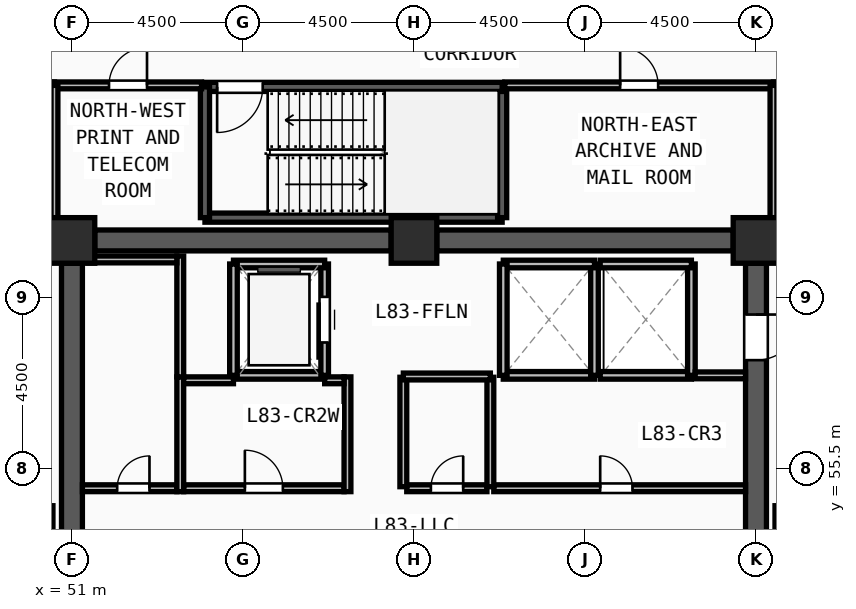
"""IFC4 building model, lengths in metres.
Left out: names, types, materials, properties, quantities, classifications, styles, units other than length and angle.
Written with IfcOpenShell. Run it as: python <this file> out.ifc"""

import sys

from ifc_helpers import new_model, si_unit, direction, frame, frame_2d, origin, origin_2d, place, context, subcontext, project, spatial, rectangle, extrude, source, transform, mapped, element, fill, save


model = new_model("IFC4")
c1 = context("Model", 3, precision=1e-05, world=origin(), true_north=direction((0.0, 1.0)))
c2 = subcontext(c1, "Body", "Model", "MODEL_VIEW")
j1 = project(units=[si_unit("LENGTHUNIT", "METRE"), si_unit("PLANEANGLEUNIT", "RADIAN")], contexts=[c1])
p1 = place(None, origin())
s1 = spatial("IfcSite", under=j1, at=p1, CompositionType="ELEMENT")
p2 = place(p1, origin())
s2 = spatial("IfcBuilding", under=s1, at=p2, CompositionType="ELEMENT")
p3 = place(p2, frame((0.0, 0.0, 320.25)))
s3 = spatial("IfcBuildingStorey", under=s2, at=p3, CompositionType="ELEMENT", Elevation=320.25)
m1 = source(origin(), c2, "Body", "SweptSolid", [
    extrude(rectangle(XDim=1.2, YDim=1.2, at=origin_2d()), origin(), (0.0, 0.0, 1.0), 3.75),
])
for number, where, z_axis, x_axis in (
    (1, (69.0, 61.5, 0.0), (0.0, 0.0, 1.0), (1.0, 0.0, 0.0)),
    (2, (60.0, 61.5, 0.0), (0.0, 0.0, 1.0), (1.0, 0.0, 0.0)),
    (3, (51.0, 61.5, 0.0), (0.0, 0.0, 1.0), (1.0, 0.0, 0.0)),
):
    element("IfcColumn", number, at=place(p3, frame(where, z_axis=z_axis, x_axis=x_axis)), inside=s3, PredefinedType="COLUMN", context=c2, shape_type="MappedRepresentation", body=[
        mapped(m1, transform((0.0, 0.0, 0.0), x_axis=(1.0, 0.0, 0.0), y_axis=(0.0, 1.0, 0.0), z_axis=(0.0, 0.0, 1.0), scale=1.0)),
    ])
for number, where, z_axis, x_axis in (
    (4, (51.6, 61.5, 0.0), (0.0, 0.0, 1.0), (1.0, 0.0, 0.0)),
    (5, (60.6, 61.5, 0.0), (0.0, 0.0, 1.0), (1.0, 0.0, 0.0)),
):
    element("IfcWall", number, at=place(p3, frame(where, z_axis=z_axis, x_axis=x_axis)), inside=s3, PredefinedType="SHEAR", context=c2, shape_type="SweptSolid", body=[
        extrude(rectangle(XDim=7.8, YDim=0.55, at=frame_2d((3.9, 0.0))), origin(), (0.0, 0.0, 1.0), 3.47),
    ])
p4 = place(p3, frame((69.0, 60.9, 0.0), z_axis=(0.0, 0.0, 1.0), x_axis=(0.0, -1.0, 0.0)))
e6 = element("IfcWall", 6, at=p4, inside=s3, PredefinedType="SHEAR", context=c2, shape_type="SweptSolid", body=[
    extrude(rectangle(XDim=13.8, YDim=0.55, at=frame_2d((6.9, 0.0))), origin(), (0.0, 0.0, 1.0), 3.47),
])
m2 = source(origin(), c2, "Body", "SweptSolid", [
    extrude(rectangle(XDim=1.2, YDim=2.2, at=frame_2d((0.6, 1.1))), frame((0.0, 0.285, 0.0), z_axis=(0.0, -1.0, 0.0), x_axis=(1.0, 0.0, 0.0)), (0.0, 0.0, 1.0), 0.57),
])
p5 = place(p4, frame((1.35, 0.0, 0.0)))
e7 = element("IfcOpeningElement", 7, at=p5, cuts=e6, PredefinedType="OPENING", context=c2, shape_type="MappedRepresentation", body=[
    mapped(m2, transform((0.0, 0.0, 0.0), x_axis=(1.0, 0.0, 0.0), y_axis=(0.0, 1.0, 0.0), z_axis=(0.0, 0.0, 1.0), scale=1.0)),
])
p6 = place(p3, frame((51.0, 47.1, 0.0), z_axis=(0.0, 0.0, 1.0), x_axis=(0.0, 1.0, 0.0)))
e8 = element("IfcWall", 8, at=p6, inside=s3, PredefinedType="SHEAR", context=c2, shape_type="SweptSolid", body=[
    extrude(rectangle(XDim=13.8, YDim=0.55, at=frame_2d((6.9, 0.0))), origin(), (0.0, 0.0, 1.0), 3.47),
])
for number, where, z_axis, x_axis in (
    (9, (50.38, 46.7, 0.0), (0.0, 0.0, 1.0), (0.0, 1.0, 0.0)),
    (10, (69.62, 54.52, 0.0), (0.0, 0.0, 1.0), (0.0, -1.0, 0.0)),
    (11, (54.5, 62.1, 0.0), (0.0, 0.0, 1.0), (1.0, 0.0, 0.0)),
):
    element("IfcWall", number, at=place(p3, frame(where, z_axis=z_axis, x_axis=x_axis)), inside=s3, PredefinedType="SOLIDWALL", context=c2, shape_type="SweptSolid", body=[
        extrude(rectangle(XDim=7.82, YDim=0.24, at=frame_2d((3.91, 0.0))), origin(), (0.0, 0.0, 1.0), 3.47),
    ])
p7 = place(p3, frame((62.32, 62.1, 0.0), z_axis=(0.0, 0.0, 1.0), x_axis=(0.0, 1.0, 0.0)))
e12 = element("IfcWall", 12, at=p7, inside=s3, PredefinedType="SOLIDWALL", context=c2, shape_type="SweptSolid", body=[
    extrude(rectangle(XDim=3.44, YDim=0.24, at=frame_2d((1.72, 0.0))), origin(), (0.0, 0.0, 1.0), 3.47),
])
p8 = place(p3, frame((62.32, 65.54, 0.0), z_axis=(0.0, 0.0, 1.0), x_axis=(-1.0, 0.0, 0.0)))
e13 = element("IfcWall", 13, at=p8, inside=s3, PredefinedType="SOLIDWALL", context=c2, shape_type="SweptSolid", body=[
    extrude(rectangle(XDim=7.82, YDim=0.24, at=frame_2d((3.91, 0.0))), origin(), (0.0, 0.0, 1.0), 3.47),
])
m3 = source(origin(), c2, "Body", "SweptSolid", [
    extrude(rectangle(XDim=1.2, YDim=2.2, at=frame_2d((0.6, 1.1))), frame((0.0, 0.13, 0.0), z_axis=(0.0, -1.0, 0.0), x_axis=(1.0, 0.0, 0.0)), (0.0, 0.0, 1.0), 0.26),
])
p9 = place(p8, frame((6.3, 0.0, 0.0)))
e14 = element("IfcOpeningElement", 14, at=p9, cuts=e13, PredefinedType="OPENING", context=c2, shape_type="MappedRepresentation", body=[
    mapped(m3, transform((0.0, 0.0, 0.0), x_axis=(1.0, 0.0, 0.0), y_axis=(0.0, 1.0, 0.0), z_axis=(0.0, 0.0, 1.0), scale=1.0)),
])
p10 = place(p3, frame((54.5, 65.54, 0.0), z_axis=(0.0, 0.0, 1.0), x_axis=(0.0, -1.0, 0.0)))
e15 = element("IfcWall", 15, at=p10, inside=s3, PredefinedType="SOLIDWALL", context=c2, shape_type="SweptSolid", body=[
    extrude(rectangle(XDim=3.44, YDim=0.24, at=frame_2d((1.72, 0.0))), origin(), (0.0, 0.0, 1.0), 3.47),
])
p11 = place(p3, frame((55.25, 57.95, 0.0), z_axis=(0.0, 0.0, 1.0), x_axis=(1.0, 0.0, 0.0)))
e16 = element("IfcWall", 16, at=p11, inside=s3, PredefinedType="SOLIDWALL", context=c2, shape_type="SweptSolid", body=[
    extrude(rectangle(XDim=2.4, YDim=0.2, at=frame_2d((1.2, 0.0))), origin(), (0.0, 0.0, 1.0), 3.47),
])
p12 = place(p3, frame((57.65, 57.95, 0.0), z_axis=(0.0, 0.0, 1.0), x_axis=(0.0, 1.0, 0.0)))
e17 = element("IfcWall", 17, at=p12, inside=s3, PredefinedType="SOLIDWALL", context=c2, shape_type="SweptSolid", body=[
    extrude(rectangle(XDim=2.93, YDim=0.2, at=frame_2d((1.465, 0.0))), origin(), (0.0, 0.0, 1.0), 3.47),
])
m4 = source(origin(), c2, "Body", "SweptSolid", [
    extrude(rectangle(XDim=1.2, YDim=2.3, at=frame_2d((0.6, 1.15))), frame((0.0, 0.11, 0.0), z_axis=(0.0, -1.0, 0.0), x_axis=(1.0, 0.0, 0.0)), (0.0, 0.0, 1.0), 0.22),
])
p13 = place(p12, frame((0.865, 0.0, 0.0)))
e18 = element("IfcOpeningElement", 18, at=p13, cuts=e17, PredefinedType="OPENING", context=c2, shape_type="MappedRepresentation", body=[
    mapped(m4, transform((0.0, 0.0, 0.0), x_axis=(1.0, 0.0, 0.0), y_axis=(0.0, 1.0, 0.0), z_axis=(0.0, 0.0, 1.0), scale=1.0)),
])
p14 = place(p3, frame((57.65, 60.88, 0.0), z_axis=(0.0, 0.0, 1.0), x_axis=(-1.0, 0.0, 0.0)))
e19 = element("IfcWall", 19, at=p14, inside=s3, PredefinedType="SOLIDWALL", context=c2, shape_type="SweptSolid", body=[
    extrude(rectangle(XDim=2.4, YDim=0.2, at=frame_2d((1.2, 0.0))), origin(), (0.0, 0.0, 1.0), 3.47),
])
p15 = place(p3, frame((55.25, 60.88, 0.0), z_axis=(0.0, 0.0, 1.0), x_axis=(0.0, -1.0, 0.0)))
e20 = element("IfcWall", 20, at=p15, inside=s3, PredefinedType="SOLIDWALL", context=c2, shape_type="SweptSolid", body=[
    extrude(rectangle(XDim=2.93, YDim=0.2, at=frame_2d((1.465, 0.0))), origin(), (0.0, 0.0, 1.0), 3.47),
])
p16 = place(p3, frame((62.35, 57.95, 0.0), z_axis=(0.0, 0.0, 1.0), x_axis=(1.0, 0.0, 0.0)))
e21 = element("IfcWall", 21, at=p16, inside=s3, PredefinedType="SOLIDWALL", context=c2, shape_type="SweptSolid", body=[
    extrude(rectangle(XDim=2.4, YDim=0.2, at=frame_2d((1.2, 0.0))), origin(), (0.0, 0.0, 1.0), 3.47),
])
p17 = place(p3, frame((64.75, 57.95, 0.0), z_axis=(0.0, 0.0, 1.0), x_axis=(0.0, 1.0, 0.0)))
e22 = element("IfcWall", 22, at=p17, inside=s3, PredefinedType="SOLIDWALL", context=c2, shape_type="SweptSolid", body=[
    extrude(rectangle(XDim=2.93, YDim=0.2, at=frame_2d((1.465, 0.0))), origin(), (0.0, 0.0, 1.0), 3.47),
])
p18 = place(p3, frame((64.75, 60.88, 0.0), z_axis=(0.0, 0.0, 1.0), x_axis=(-1.0, 0.0, 0.0)))
e23 = element("IfcWall", 23, at=p18, inside=s3, PredefinedType="SOLIDWALL", context=c2, shape_type="SweptSolid", body=[
    extrude(rectangle(XDim=2.4, YDim=0.2, at=frame_2d((1.2, 0.0))), origin(), (0.0, 0.0, 1.0), 3.47),
])
p19 = place(p3, frame((62.35, 60.88, 0.0), z_axis=(0.0, 0.0, 1.0), x_axis=(0.0, -1.0, 0.0)))
e24 = element("IfcWall", 24, at=p19, inside=s3, PredefinedType="SOLIDWALL", context=c2, shape_type="SweptSolid", body=[
    extrude(rectangle(XDim=2.93, YDim=0.2, at=frame_2d((1.465, 0.0))), origin(), (0.0, 0.0, 1.0), 3.47),
])
p20 = place(p3, frame((64.9, 57.95, 0.0), z_axis=(0.0, 0.0, 1.0), x_axis=(1.0, 0.0, 0.0)))
e25 = element("IfcWall", 25, at=p20, inside=s3, PredefinedType="SOLIDWALL", context=c2, shape_type="SweptSolid", body=[
    extrude(rectangle(XDim=2.4, YDim=0.2, at=frame_2d((1.2, 0.0))), origin(), (0.0, 0.0, 1.0), 3.47),
])
p21 = place(p3, frame((67.3, 57.95, 0.0), z_axis=(0.0, 0.0, 1.0), x_axis=(0.0, 1.0, 0.0)))
e26 = element("IfcWall", 26, at=p21, inside=s3, PredefinedType="SOLIDWALL", context=c2, shape_type="SweptSolid", body=[
    extrude(rectangle(XDim=2.93, YDim=0.2, at=frame_2d((1.465, 0.0))), origin(), (0.0, 0.0, 1.0), 3.47),
])
p22 = place(p3, frame((67.3, 60.88, 0.0), z_axis=(0.0, 0.0, 1.0), x_axis=(-1.0, 0.0, 0.0)))
e27 = element("IfcWall", 27, at=p22, inside=s3, PredefinedType="SOLIDWALL", context=c2, shape_type="SweptSolid", body=[
    extrude(rectangle(XDim=2.4, YDim=0.2, at=frame_2d((1.2, 0.0))), origin(), (0.0, 0.0, 1.0), 3.47),
])
p23 = place(p3, frame((53.94, 54.98, 0.0), z_axis=(0.0, 0.0, 1.0), x_axis=(1.0, 0.0, 0.0)))
e28 = element("IfcWall", 28, at=p23, inside=s3, PredefinedType="PARTITIONING", context=c2, shape_type="SweptSolid", body=[
    extrude(rectangle(XDim=4.22, YDim=0.18, at=frame_2d((2.11, 0.0))), origin(), (0.0, 0.0, 1.0), 3.47),
])
m5 = source(origin(), c2, "Body", "SweptSolid", [
    extrude(rectangle(XDim=1.0, YDim=2.2, at=frame_2d((0.5, 1.1))), frame((0.0, 0.1, 0.0), z_axis=(0.0, -1.0, 0.0), x_axis=(1.0, 0.0, 0.0)), (0.0, 0.0, 1.0), 0.2),
])
p24 = place(p23, frame((1.61, 0.0, 0.0)))
e29 = element("IfcOpeningElement", 29, at=p24, cuts=e28, PredefinedType="OPENING", context=c2, shape_type="MappedRepresentation", body=[
    mapped(m5, transform((0.0, 0.0, 0.0), x_axis=(1.0, 0.0, 0.0), y_axis=(0.0, 1.0, 0.0), z_axis=(0.0, 0.0, 1.0), scale=1.0)),
])
p25 = place(p3, frame((51.275, 54.98, 0.0), z_axis=(0.0, 0.0, 1.0), x_axis=(1.0, 0.0, 0.0)))
e30 = element("IfcWall", 30, at=p25, inside=s3, PredefinedType="PARTITIONING", context=c2, shape_type="SweptSolid", body=[
    extrude(rectangle(XDim=2.485, YDim=0.18, at=frame_2d((1.243, 0.0))), origin(), (0.0, 0.0, 1.0), 3.47),
])
m6 = source(origin(), c2, "Body", "SweptSolid", [
    extrude(rectangle(XDim=0.85, YDim=2.1, at=frame_2d((0.425, 1.05))), frame((0.0, 0.1, 0.0), z_axis=(0.0, -1.0, 0.0), x_axis=(1.0, 0.0, 0.0)), (0.0, 0.0, 1.0), 0.2),
])
p26 = place(p25, frame((0.915, 0.0, 0.0)))
e31 = element("IfcOpeningElement", 31, at=p26, cuts=e30, PredefinedType="OPENING", context=c2, shape_type="MappedRepresentation", body=[
    mapped(m6, transform((0.0, 0.0, 0.0), x_axis=(1.0, 0.0, 0.0), y_axis=(0.0, 1.0, 0.0), z_axis=(0.0, 0.0, 1.0), scale=1.0)),
])
p27 = place(p3, frame((62.1, 54.98, 0.0), z_axis=(0.0, 0.0, 1.0), x_axis=(1.0, 0.0, 0.0)))
e32 = element("IfcWall", 32, at=p27, inside=s3, PredefinedType="PARTITIONING", context=c2, shape_type="SweptSolid", body=[
    extrude(rectangle(XDim=6.625, YDim=0.18, at=frame_2d((3.312, 0.0))), origin(), (0.0, 0.0, 1.0), 3.47),
])
p28 = place(p27, frame((2.8, 0.0, 0.0)))
e33 = element("IfcOpeningElement", 33, at=p28, cuts=e32, PredefinedType="OPENING", context=c2, shape_type="MappedRepresentation", body=[
    mapped(m6, transform((0.0, 0.0, 0.0), x_axis=(1.0, 0.0, 0.0), y_axis=(0.0, 1.0, 0.0), z_axis=(0.0, 0.0, 1.0), scale=1.0)),
])
p29 = place(p3, frame((59.81, 54.98, 0.0), z_axis=(0.0, 0.0, 1.0), x_axis=(1.0, 0.0, 0.0)))
e34 = element("IfcWall", 34, at=p29, inside=s3, PredefinedType="PARTITIONING", context=c2, shape_type="SweptSolid", body=[
    extrude(rectangle(XDim=2.11, YDim=0.18, at=frame_2d((1.055, 0.0))), origin(), (0.0, 0.0, 1.0), 3.47),
])
p30 = place(p29, frame((0.635, 0.0, 0.0)))
e35 = element("IfcOpeningElement", 35, at=p30, cuts=e34, PredefinedType="OPENING", context=c2, shape_type="MappedRepresentation", body=[
    mapped(m6, transform((0.0, 0.0, 0.0), x_axis=(1.0, 0.0, 0.0), y_axis=(0.0, 1.0, 0.0), z_axis=(0.0, 0.0, 1.0), scale=1.0)),
])
p31 = place(p3, frame((50.54, 65.58, 0.0), z_axis=(0.0, 0.0, 1.0), x_axis=(1.0, 0.0, 0.0)))
e36 = element("IfcWall", 36, at=p31, inside=s3, PredefinedType="PARTITIONING", context=c2, shape_type="SweptSolid", body=[
    extrude(rectangle(XDim=3.87, YDim=0.18, at=frame_2d((1.935, 0.0))), origin(), (0.0, 0.0, 1.0), 3.47),
])
p32 = place(p31, frame((1.435, 0.0, 0.0)))
e37 = element("IfcOpeningElement", 37, at=p32, cuts=e36, PredefinedType="OPENING", context=c2, shape_type="MappedRepresentation", body=[
    mapped(m5, transform((0.0, 0.0, 0.0), x_axis=(1.0, 0.0, 0.0), y_axis=(0.0, 1.0, 0.0), z_axis=(0.0, 0.0, 1.0), scale=1.0)),
])
p33 = place(p3, frame((62.39, 65.58, 0.0), z_axis=(0.0, 0.0, 1.0), x_axis=(1.0, 0.0, 0.0)))
e38 = element("IfcWall", 38, at=p33, inside=s3, PredefinedType="PARTITIONING", context=c2, shape_type="SweptSolid", body=[
    extrude(rectangle(XDim=7.07, YDim=0.18, at=frame_2d((3.535, 0.0))), origin(), (0.0, 0.0, 1.0), 3.47),
])
p34 = place(p33, frame((3.035, 0.0, 0.0)))
e39 = element("IfcOpeningElement", 39, at=p34, cuts=e38, PredefinedType="OPENING", context=c2, shape_type="MappedRepresentation", body=[
    mapped(m5, transform((0.0, 0.0, 0.0), x_axis=(1.0, 0.0, 0.0), y_axis=(0.0, 1.0, 0.0), z_axis=(0.0, 0.0, 1.0), scale=1.0)),
])
p35 = place(p3, frame((46.7, 65.58, 0.0), z_axis=(0.0, 0.0, 1.0), x_axis=(1.0, 0.0, 0.0)))
e40 = element("IfcWall", 40, at=p35, inside=s3, PredefinedType="PARTITIONING", context=c2, shape_type="SweptSolid", body=[
    extrude(rectangle(XDim=3.84, YDim=0.18, at=frame_2d((1.92, 0.0))), origin(), (0.0, 0.0, 1.0), 3.47),
])
m7 = source(origin(), c2, "Body", "SweptSolid", [
    extrude(rectangle(XDim=1.3, YDim=2.2, at=frame_2d((0.65, 1.1))), frame((0.0, 0.1, 0.0), z_axis=(0.0, -1.0, 0.0), x_axis=(1.0, 0.0, 0.0)), (0.0, 0.0, 1.0), 0.2),
])
p36 = place(p35, frame((1.27, 0.0, 0.0)))
e41 = element("IfcOpeningElement", 41, at=p36, cuts=e40, PredefinedType="OPENING", context=c2, shape_type="MappedRepresentation", body=[
    mapped(m7, transform((0.0, 0.0, 0.0), x_axis=(1.0, 0.0, 0.0), y_axis=(0.0, 1.0, 0.0), z_axis=(0.0, 0.0, 1.0), scale=1.0)),
])
p37 = place(p3, frame((69.46, 65.58, 0.0), z_axis=(0.0, 0.0, 1.0), x_axis=(1.0, 0.0, 0.0)))
e42 = element("IfcWall", 42, at=p37, inside=s3, PredefinedType="PARTITIONING", context=c2, shape_type="SweptSolid", body=[
    extrude(rectangle(XDim=3.84, YDim=0.18, at=frame_2d((1.92, 0.0))), origin(), (0.0, 0.0, 1.0), 3.47),
])
p38 = place(p37, frame((1.27, 0.0, 0.0)))
e43 = element("IfcOpeningElement", 43, at=p38, cuts=e42, PredefinedType="OPENING", context=c2, shape_type="MappedRepresentation", body=[
    mapped(m7, transform((0.0, 0.0, 0.0), x_axis=(1.0, 0.0, 0.0), y_axis=(0.0, 1.0, 0.0), z_axis=(0.0, 0.0, 1.0), scale=1.0)),
])
for number, where, z_axis, x_axis in (
    (44, (59.72, 55.02, 0.0), (0.0, 0.0, 1.0), (0.0, 1.0, 0.0)),
    (45, (62.01, 55.02, 0.0), (0.0, 0.0, 1.0), (0.0, 1.0, 0.0)),
):
    element("IfcWall", number, at=place(p3, frame(where, z_axis=z_axis, x_axis=x_axis)), inside=s3, PredefinedType="PARTITIONING", context=c2, shape_type="SweptSolid", body=[
        extrude(rectangle(XDim=2.88, YDim=0.18, at=frame_2d((1.44, 0.0))), origin(), (0.0, 0.0, 1.0), 3.47),
    ])
p39 = place(p3, frame((59.72, 57.92, 0.0), z_axis=(0.0, 0.0, 1.0), x_axis=(1.0, 0.0, 0.0)))
e46 = element("IfcWall", 46, at=p39, inside=s3, PredefinedType="PARTITIONING", context=c2, shape_type="SweptSolid", body=[
    extrude(rectangle(XDim=2.29, YDim=0.18, at=frame_2d((1.145, 0.0))), origin(), (0.0, 0.0, 1.0), 3.47),
])
for number, where, z_axis, x_axis in (
    (47, (50.54, 61.95, 0.0), (0.0, 0.0, 1.0), (0.0, 1.0, 0.0)),
    (48, (69.46, 61.95, 0.0), (0.0, 0.0, 1.0), (0.0, 1.0, 0.0)),
):
    element("IfcWall", number, at=place(p3, frame(where, z_axis=z_axis, x_axis=x_axis)), inside=s3, PredefinedType="PARTITIONING", context=c2, shape_type="SweptSolid", body=[
        extrude(rectangle(XDim=3.63, YDim=0.18, at=frame_2d((1.815, 0.0))), origin(), (0.0, 0.0, 1.0), 3.47),
    ])
for number, where, z_axis, x_axis in (
    (49, (53.85, 54.89, 0.0), (0.0, 0.0, 1.0), (0.0, 1.0, 0.0)),
    (50, (58.25, 54.89, 0.0), (0.0, 0.0, 1.0), (0.0, 1.0, 0.0)),
):
    element("IfcWall", number, at=place(p3, frame(where, z_axis=z_axis, x_axis=x_axis)), inside=s3, PredefinedType="PARTITIONING", context=c2, shape_type="SweptSolid", body=[
        extrude(rectangle(XDim=3.02, YDim=0.18, at=frame_2d((1.51, 0.0))), origin(), (0.0, 0.0, 1.0), 3.47),
    ])
p40 = place(p3, frame((53.94, 57.82, 0.0), z_axis=(0.0, 0.0, 1.0), x_axis=(1.0, 0.0, 0.0)))
e51 = element("IfcWall", 51, at=p40, inside=s3, PredefinedType="PARTITIONING", context=c2, shape_type="SweptSolid", body=[
    extrude(rectangle(XDim=1.31, YDim=0.18, at=frame_2d((0.655, 0.0))), origin(), (0.0, 0.0, 1.0), 3.47),
])
p41 = place(p3, frame((57.65, 57.82, 0.0), z_axis=(0.0, 0.0, 1.0), x_axis=(1.0, 0.0, 0.0)))
e52 = element("IfcWall", 52, at=p41, inside=s3, PredefinedType="PARTITIONING", context=c2, shape_type="SweptSolid", body=[
    extrude(rectangle(XDim=0.51, YDim=0.18, at=frame_2d((0.255, 0.0))), origin(), (0.0, 0.0, 1.0), 3.47),
])
p42 = place(p3, frame((53.85, 57.91, 0.0), z_axis=(0.0, 0.0, 1.0), x_axis=(0.0, 1.0, 0.0)))
e53 = element("IfcWall", 53, at=p42, inside=s3, PredefinedType="PARTITIONING", context=c2, shape_type="SweptSolid", body=[
    extrude(rectangle(XDim=3.18, YDim=0.18, at=frame_2d((1.59, 0.0))), origin(), (0.0, 0.0, 1.0), 3.47),
])
p43 = place(p3, frame((51.437, 61.0, 0.0), z_axis=(0.0, 0.0, 1.0), x_axis=(1.0, 0.0, 0.0)))
e54 = element("IfcWall", 54, at=p43, inside=s3, PredefinedType="PARTITIONING", context=c2, shape_type="SweptSolid", body=[
    extrude(rectangle(XDim=2.323, YDim=0.18, at=frame_2d((1.162, 0.0))), origin(), (0.0, 0.0, 1.0), 3.47),
])
p44 = place(p3, frame((67.4, 57.95, 0.0), z_axis=(0.0, 0.0, 1.0), x_axis=(1.0, 0.0, 0.0)))
e55 = element("IfcWall", 55, at=p44, inside=s3, PredefinedType="PARTITIONING", context=c2, shape_type="SweptSolid", body=[
    extrude(rectangle(XDim=1.325, YDim=0.18, at=frame_2d((0.663, 0.0))), origin(), (0.0, 0.0, 1.0), 3.47),
])
m8 = source(origin(), c2, "Body", "SweptSolid", [
    extrude(rectangle(XDim=1.2, YDim=2.2, at=frame_2d((0.6, 1.1))), frame((0.0, 0.025, 0.0), z_axis=(0.0, -1.0, 0.0), x_axis=(1.0, 0.0, 0.0)), (0.0, 0.0, 1.0), 0.05),
])
p45 = place(p5, origin())
e56 = element("IfcDoor", 56, at=p45, inside=s3, OperationType="SINGLE_SWING_LEFT", PredefinedType="DOOR", context=c2, shape_type="MappedRepresentation", body=[
    mapped(m8, transform((0.0, 0.0, 0.0), x_axis=(1.0, 0.0, 0.0), y_axis=(0.0, 1.0, 0.0), z_axis=(0.0, 0.0, 1.0), scale=1.0)),
])
fill(e7, e56)
p46 = place(p9, origin())
e57 = element("IfcDoor", 57, at=p46, inside=s3, OperationType="SINGLE_SWING_RIGHT", PredefinedType="DOOR", context=c2, shape_type="MappedRepresentation", body=[
    mapped(m8, transform((0.0, 0.0, 0.0), x_axis=(1.0, 0.0, 0.0), y_axis=(0.0, 1.0, 0.0), z_axis=(0.0, 0.0, 1.0), scale=1.0)),
])
fill(e14, e57)
m9 = source(origin(), c2, "Body", "SweptSolid", [
    extrude(rectangle(XDim=1.2, YDim=2.3, at=frame_2d((0.6, 1.15))), frame((0.0, 0.025, 0.0), z_axis=(0.0, -1.0, 0.0), x_axis=(1.0, 0.0, 0.0)), (0.0, 0.0, 1.0), 0.05),
])
p47 = place(p13, origin())
e58 = element("IfcDoor", 58, at=p47, inside=s3, OperationType="SLIDING_TO_LEFT", PredefinedType="DOOR", context=c2, shape_type="MappedRepresentation", body=[
    mapped(m9, transform((0.0, 0.0, 0.0), x_axis=(1.0, 0.0, 0.0), y_axis=(0.0, 1.0, 0.0), z_axis=(0.0, 0.0, 1.0), scale=1.0)),
])
fill(e18, e58)
m10 = source(origin(), c2, "Body", "SweptSolid", [
    extrude(rectangle(XDim=1.0, YDim=2.2, at=frame_2d((0.5, 1.1))), frame((0.0, 0.025, 0.0), z_axis=(0.0, -1.0, 0.0), x_axis=(1.0, 0.0, 0.0)), (0.0, 0.0, 1.0), 0.05),
])
p48 = place(p24, origin())
e59 = element("IfcDoor", 59, at=p48, inside=s3, OperationType="SINGLE_SWING_LEFT", PredefinedType="DOOR", context=c2, shape_type="MappedRepresentation", body=[
    mapped(m10, transform((0.0, 0.0, 0.0), x_axis=(1.0, 0.0, 0.0), y_axis=(0.0, 1.0, 0.0), z_axis=(0.0, 0.0, 1.0), scale=1.0)),
])
fill(e29, e59)
m11 = source(origin(), c2, "Body", "SweptSolid", [
    extrude(rectangle(XDim=0.85, YDim=2.1, at=frame_2d((0.425, 1.05))), frame((0.0, 0.025, 0.0), z_axis=(0.0, -1.0, 0.0), x_axis=(1.0, 0.0, 0.0)), (0.0, 0.0, 1.0), 0.05),
])
p49 = place(p26, origin())
e60 = element("IfcDoor", 60, at=p49, inside=s3, OperationType="SINGLE_SWING_RIGHT", PredefinedType="DOOR", context=c2, shape_type="MappedRepresentation", body=[
    mapped(m11, transform((0.0, 0.0, 0.0), x_axis=(1.0, 0.0, 0.0), y_axis=(0.0, 1.0, 0.0), z_axis=(0.0, 0.0, 1.0), scale=1.0)),
])
fill(e31, e60)
p50 = place(p28, origin())
e61 = element("IfcDoor", 61, at=p50, inside=s3, OperationType="SINGLE_SWING_LEFT", PredefinedType="DOOR", context=c2, shape_type="MappedRepresentation", body=[
    mapped(m11, transform((0.0, 0.0, 0.0), x_axis=(1.0, 0.0, 0.0), y_axis=(0.0, 1.0, 0.0), z_axis=(0.0, 0.0, 1.0), scale=1.0)),
])
fill(e33, e61)
p51 = place(p30, origin())
e62 = element("IfcDoor", 62, at=p51, inside=s3, OperationType="SINGLE_SWING_RIGHT", PredefinedType="DOOR", context=c2, shape_type="MappedRepresentation", body=[
    mapped(m11, transform((0.0, 0.0, 0.0), x_axis=(1.0, 0.0, 0.0), y_axis=(0.0, 1.0, 0.0), z_axis=(0.0, 0.0, 1.0), scale=1.0)),
])
fill(e35, e62)
p52 = place(p32, origin())
e63 = element("IfcDoor", 63, at=p52, inside=s3, OperationType="SINGLE_SWING_RIGHT", PredefinedType="DOOR", context=c2, shape_type="MappedRepresentation", body=[
    mapped(m10, transform((0.0, 0.0, 0.0), x_axis=(1.0, 0.0, 0.0), y_axis=(0.0, 1.0, 0.0), z_axis=(0.0, 0.0, 1.0), scale=1.0)),
])
fill(e37, e63)
p53 = place(p34, origin())
e64 = element("IfcDoor", 64, at=p53, inside=s3, OperationType="SINGLE_SWING_LEFT", PredefinedType="DOOR", context=c2, shape_type="MappedRepresentation", body=[
    mapped(m10, transform((0.0, 0.0, 0.0), x_axis=(1.0, 0.0, 0.0), y_axis=(0.0, 1.0, 0.0), z_axis=(0.0, 0.0, 1.0), scale=1.0)),
])
fill(e39, e64)
save(model, sys.argv[1])
